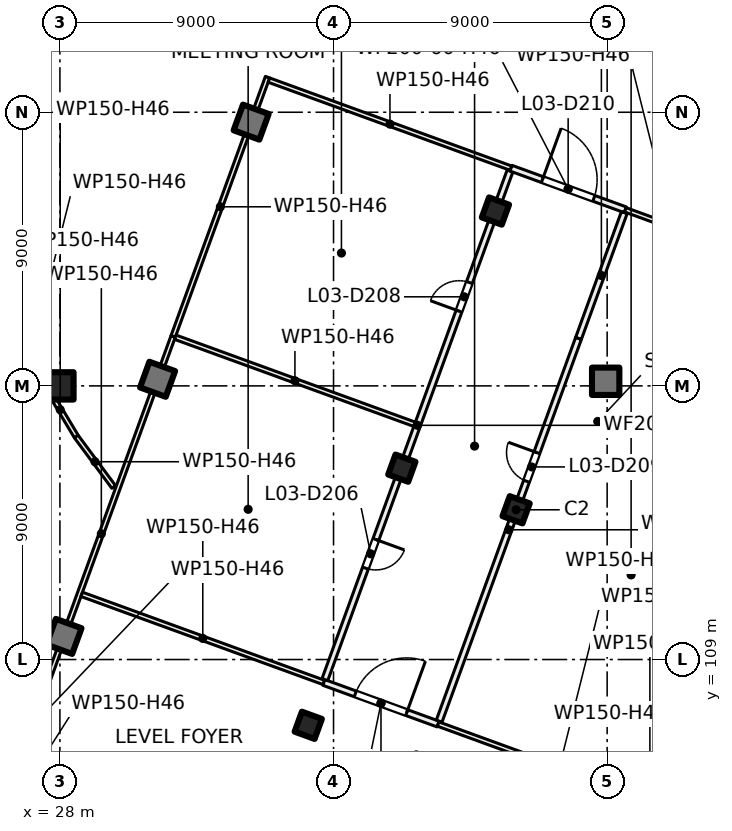
"""IFC4 building model, lengths in metres.
Left out: names, types, materials, properties, quantities, classifications, styles, units other than length and angle.
Written with IfcOpenShell. Run it as: python <this file> out.ifc"""

import sys

from ifc_helpers import new_model, si_unit, direction, frame, frame_2d, origin, origin_2d, place, context, subcontext, project, spatial, rectangle, extrude, element, fill, save


model = new_model("IFC4")
c1 = context("Model", 3, precision=1e-05, world=origin(), true_north=direction((0.0, 1.0)))
c2 = subcontext(c1, "Body", "Model", "MODEL_VIEW")
j1 = project(units=[si_unit("LENGTHUNIT", "METRE"), si_unit("PLANEANGLEUNIT", "RADIAN")], contexts=[c1])
p1 = place(None, origin())
s1 = spatial("IfcSite", under=j1, at=p1, CompositionType="ELEMENT")
p2 = place(p1, origin())
s2 = spatial("IfcBuilding", under=s1, at=p2, CompositionType="ELEMENT")
p3 = place(p2, frame((0.0, 0.0, 17.5)))
s3 = spatial("IfcBuildingStorey", under=s2, at=p3, CompositionType="ELEMENT", Elevation=17.5)
for number, where, z_axis, x_axis in (
    (1, (28.0, 118.0, 0.0), (0.0, 0.0, 1.0), (1.0, 0.0, 0.0)),
    (2, (45.952, 118.152, 0.0), (0.0, 0.0, 1.0), (1.0, 0.0, 0.0)),
):
    element("IfcColumn", number, at=place(p3, frame(where, z_axis=z_axis, x_axis=x_axis)), inside=s3, PredefinedType="COLUMN", context=c2, shape_type="SweptSolid", body=[
        extrude(rectangle(XDim=0.9, YDim=0.9, at=origin_2d()), origin(), (0.0, 0.0, 1.0), 5.0),
    ])
for number, where, z_axis, x_axis in (
    (3, (43.006, 113.925, 0.0), (0.0, 0.0, 1.0), (-0.342, -0.94, 0.0)),
    (4, (42.325, 123.751, 0.0), (0.0, 0.0, 1.0), (-0.342, -0.94, 0.0)),
    (5, (39.247, 115.293, 0.0), (0.0, 0.0, 1.0), (-0.342, -0.94, 0.0)),
    (6, (36.169, 106.836, 0.0), (0.0, 0.0, 1.0), (-0.342, -0.94, 0.0)),
):
    element("IfcColumn", number, at=place(p3, frame(where, z_axis=z_axis, x_axis=x_axis)), inside=s3, PredefinedType="COLUMN", context=c2, shape_type="SweptSolid", body=[
        extrude(rectangle(XDim=0.7, YDim=0.7, at=origin_2d()), origin(), (0.0, 0.0, 1.0), 5.0),
    ])
for number, where, z_axis, x_axis in (
    (7, (34.291, 126.675, 0.0), (0.0, 0.0, 1.0), (-0.342, -0.94, 0.0)),
    (8, (31.212, 118.218, 0.0), (0.0, 0.0, 1.0), (-0.342, -0.94, 0.0)),
    (9, (28.134, 109.76, 0.0), (0.0, 0.0, 1.0), (-0.342, -0.94, 0.0)),
):
    element("IfcColumn", number, at=place(p3, frame(where, z_axis=z_axis, x_axis=x_axis)), inside=s3, PredefinedType="COLUMN", context=c2, shape_type="SweptSolid", body=[
        extrude(rectangle(XDim=0.9, YDim=0.9, at=origin_2d()), origin(), (0.0, 0.0, 1.0), 5.0),
    ])
p4 = place(p3, frame((12.199, 89.809, 0.0), z_axis=(0.0, 0.0, 1.0), x_axis=(0.342022998908, 0.939691581434, 0.0)))
e10 = element("IfcWall", 10, at=p4, inside=s3, PredefinedType="SOLIDWALL", context=c2, shape_type="SweptSolid", body=[
    extrude(rectangle(XDim=47.334, YDim=0.6, at=frame_2d((23.667, 0.0))), origin(), (0.0, 0.0, 1.0), 4.6),
])
p5 = place(p4, frame((0.773, 0.0, 0.9)))
e11 = element("IfcOpeningElement", 11, at=p5, cuts=e10, PredefinedType="OPENING", context=c2, shape_type="SweptSolid", body=[
    extrude(rectangle(XDim=3.0, YDim=3.0, at=frame_2d((1.5, 1.5))), frame((0.0, 0.31, 0.0), z_axis=(0.0, -1.0, 0.0), x_axis=(1.0, 0.0, 0.0)), (0.0, 0.0, 1.0), 0.62),
])
p6 = place(p4, frame((5.379, 0.0, 0.9)))
e12 = element("IfcOpeningElement", 12, at=p6, cuts=e10, PredefinedType="OPENING", context=c2, shape_type="SweptSolid", body=[
    extrude(rectangle(XDim=3.0, YDim=3.0, at=frame_2d((1.5, 1.5))), frame((0.0, 0.31, 0.0), z_axis=(0.0, -1.0, 0.0), x_axis=(1.0, 0.0, 0.0)), (0.0, 0.0, 1.0), 0.62),
])
p7 = place(p4, frame((9.235, 0.0, 0.9)))
e13 = element("IfcOpeningElement", 13, at=p7, cuts=e10, PredefinedType="OPENING", context=c2, shape_type="SweptSolid", body=[
    extrude(rectangle(XDim=3.0, YDim=3.0, at=frame_2d((1.5, 1.5))), frame((0.0, 0.31, 0.0), z_axis=(0.0, -1.0, 0.0), x_axis=(1.0, 0.0, 0.0)), (0.0, 0.0, 1.0), 0.62),
])
p8 = place(p4, frame((13.99, 0.0, 0.9)))
e14 = element("IfcOpeningElement", 14, at=p8, cuts=e10, PredefinedType="OPENING", context=c2, shape_type="SweptSolid", body=[
    extrude(rectangle(XDim=3.0, YDim=3.0, at=frame_2d((1.5, 1.5))), frame((0.0, 0.31, 0.0), z_axis=(0.0, -1.0, 0.0), x_axis=(1.0, 0.0, 0.0)), (0.0, 0.0, 1.0), 0.62),
])
p9 = place(p4, frame((18.118, 0.0, 0.9)))
e15 = element("IfcOpeningElement", 15, at=p9, cuts=e10, PredefinedType="OPENING", context=c2, shape_type="SweptSolid", body=[
    extrude(rectangle(XDim=1.2, YDim=3.0, at=frame_2d((0.6, 1.5))), frame((0.0, 0.31, 0.0), z_axis=(0.0, -1.0, 0.0), x_axis=(1.0, 0.0, 0.0)), (0.0, 0.0, 1.0), 0.62),
])
p10 = place(p4, frame((19.618, 0.0, 0.9)))
e16 = element("IfcOpeningElement", 16, at=p10, cuts=e10, PredefinedType="OPENING", context=c2, shape_type="SweptSolid", body=[
    extrude(rectangle(XDim=1.2, YDim=3.0, at=frame_2d((0.6, 1.5))), frame((0.0, 0.31, 0.0), z_axis=(0.0, -1.0, 0.0), x_axis=(1.0, 0.0, 0.0)), (0.0, 0.0, 1.0), 0.62),
])
p11 = place(p4, frame((22.452, 0.0, 0.9)))
e17 = element("IfcOpeningElement", 17, at=p11, cuts=e10, PredefinedType="OPENING", context=c2, shape_type="SweptSolid", body=[
    extrude(rectangle(XDim=3.0, YDim=3.0, at=frame_2d((1.5, 1.5))), frame((0.0, 0.31, 0.0), z_axis=(0.0, -1.0, 0.0), x_axis=(1.0, 0.0, 0.0)), (0.0, 0.0, 1.0), 0.62),
])
p12 = place(p4, frame((26.458, 0.0, 0.9)))
e18 = element("IfcOpeningElement", 18, at=p12, cuts=e10, PredefinedType="OPENING", context=c2, shape_type="SweptSolid", body=[
    extrude(rectangle(XDim=3.0, YDim=3.0, at=frame_2d((1.5, 1.5))), frame((0.0, 0.31, 0.0), z_axis=(0.0, -1.0, 0.0), x_axis=(1.0, 0.0, 0.0)), (0.0, 0.0, 1.0), 0.62),
])
p13 = place(p4, frame((32.484, 0.0, 0.9)))
e19 = element("IfcOpeningElement", 19, at=p13, cuts=e10, PredefinedType="OPENING", context=c2, shape_type="SweptSolid", body=[
    extrude(rectangle(XDim=1.2, YDim=3.0, at=frame_2d((0.6, 1.5))), frame((0.0, 0.31, 0.0), z_axis=(0.0, -1.0, 0.0), x_axis=(1.0, 0.0, 0.0)), (0.0, 0.0, 1.0), 0.62),
])
p14 = place(p4, frame((35.07, 0.0, 0.9)))
e20 = element("IfcOpeningElement", 20, at=p14, cuts=e10, PredefinedType="OPENING", context=c2, shape_type="SweptSolid", body=[
    extrude(rectangle(XDim=3.0, YDim=3.0, at=frame_2d((1.5, 1.5))), frame((0.0, 0.31, 0.0), z_axis=(0.0, -1.0, 0.0), x_axis=(1.0, 0.0, 0.0)), (0.0, 0.0, 1.0), 0.62),
])
p15 = place(p4, frame((39.676, 0.0, 0.9)))
e21 = element("IfcOpeningElement", 21, at=p15, cuts=e10, PredefinedType="OPENING", context=c2, shape_type="SweptSolid", body=[
    extrude(rectangle(XDim=3.0, YDim=3.0, at=frame_2d((1.5, 1.5))), frame((0.0, 0.31, 0.0), z_axis=(0.0, -1.0, 0.0), x_axis=(1.0, 0.0, 0.0)), (0.0, 0.0, 1.0), 0.62),
])
p16 = place(p4, frame((43.531, 0.0, 0.9)))
e22 = element("IfcOpeningElement", 22, at=p16, cuts=e10, PredefinedType="OPENING", context=c2, shape_type="SweptSolid", body=[
    extrude(rectangle(XDim=3.0, YDim=3.0, at=frame_2d((1.5, 1.5))), frame((0.0, 0.31, 0.0), z_axis=(0.0, -1.0, 0.0), x_axis=(1.0, 0.0, 0.0)), (0.0, 0.0, 1.0), 0.62),
])
p17 = place(p3, frame((27.0, 106.644, 0.0), z_axis=(0.0, 0.0, 1.0), x_axis=(0.3420012765, 0.939699487534, 0.0)))
e23 = element("IfcWall", 23, at=p17, inside=s3, PredefinedType="PARTITIONING", context=c2, shape_type="SweptSolid", body=[
    extrude(rectangle(XDim=13.816, YDim=0.15, at=frame_2d((6.908, 0.0))), origin(), (0.0, 0.0, 1.0), 4.6),
])
p18 = place(p3, frame((27.478, 118.104, 0.0), z_axis=(0.0, 0.0, 1.0), x_axis=(0.514009565734, -0.857784452141, 0.0)))
e24 = element("IfcWall", 24, at=p18, inside=s3, PredefinedType="PARTITIONING", context=c2, shape_type="SweptSolid", body=[
    extrude(rectangle(XDim=2.068, YDim=0.15, at=frame_2d((1.034, 0.0))), origin(), (0.0, 0.0, 1.0), 4.6),
])
p19 = place(p3, frame((28.537, 116.336, 0.0), z_axis=(0.0, 0.0, 1.0), x_axis=(0.595741297031, -0.80317638599, 0.0)))
e25 = element("IfcWall", 25, at=p19, inside=s3, PredefinedType="PARTITIONING", context=c2, shape_type="SweptSolid", body=[
    extrude(rectangle(XDim=2.068, YDim=0.15, at=frame_2d((1.034, 0.0))), origin(), (0.0, 0.0, 1.0), 4.6),
])
p20 = place(p3, frame((28.717, 111.144, 0.0), z_axis=(0.0, 0.0, 1.0), x_axis=(0.939731172492, -0.341914204803, 0.0)))
e26 = element("IfcWall", 26, at=p20, inside=s3, PredefinedType="PARTITIONING", context=c2, shape_type="SweptSolid", body=[
    extrude(rectangle(XDim=8.476, YDim=0.15, at=frame_2d((4.238, 0.0))), origin(), (0.0, 0.0, 1.0), 4.6),
])
p21 = place(p3, frame((31.725, 119.627, 0.0), z_axis=(0.0, 0.0, 1.0), x_axis=(0.342153449842, 0.939644090473, 0.0)))
e27 = element("IfcWall", 27, at=p21, inside=s3, PredefinedType="PARTITIONING", context=c2, shape_type="SweptSolid", body=[
    extrude(rectangle(XDim=9.075, YDim=0.15, at=frame_2d((4.537, 0.0))), origin(), (0.0, 0.0, 1.0), 4.6),
])
p22 = place(p3, frame((31.795, 119.601, 0.0), z_axis=(0.0, 0.0, 1.0), x_axis=(0.93972447093, -0.341932623092, 0.0)))
e28 = element("IfcWall", 28, at=p22, inside=s3, PredefinedType="PARTITIONING", context=c2, shape_type="SweptSolid", body=[
    extrude(rectangle(XDim=8.376, YDim=0.15, at=frame_2d((4.188, 0.0))), origin(), (0.0, 0.0, 1.0), 4.6),
])
p23 = place(p3, frame((34.874, 128.058, 0.0), z_axis=(0.0, 0.0, 1.0), x_axis=(0.939708443164, -0.341976668571, 0.0)))
e29 = element("IfcWall", 29, at=p23, inside=s3, PredefinedType="PARTITIONING", context=c2, shape_type="SweptSolid", body=[
    extrude(rectangle(XDim=8.475, YDim=0.15, at=frame_2d((4.237, 0.0))), origin(), (0.0, 0.0, 1.0), 4.6),
])
p24 = place(p3, frame((40.44, 106.878, 0.0), z_axis=(0.0, 0.0, 1.0), x_axis=(-0.939665029144, 0.342095941228, 0.0)))
e30 = element("IfcWall", 30, at=p24, inside=s3, PredefinedType="PARTITIONING", context=c2, shape_type="SweptSolid", body=[
    extrude(rectangle(XDim=3.999, YDim=0.2, at=frame_2d((2.0, 0.0))), origin(), (0.0, 0.0, 1.0), 4.6),
])
p25 = place(p24, frame((1.099, 0.0, 0.0)))
e31 = element("IfcOpeningElement", 31, at=p25, cuts=e30, PredefinedType="OPENING", context=c2, shape_type="SweptSolid", body=[
    extrude(rectangle(XDim=1.8, YDim=2.1, at=frame_2d((0.9, 1.05))), frame((0.0, 0.11, 0.0), z_axis=(0.0, -1.0, 0.0), x_axis=(1.0, 0.0, 0.0)), (0.0, 0.0, 1.0), 0.22),
])
p26 = place(p3, frame((36.716, 108.34, 0.0), z_axis=(0.0, 0.0, 1.0), x_axis=(0.342029387276, 0.939689256212, 0.0)))
e32 = element("IfcWall", 32, at=p26, inside=s3, PredefinedType="PARTITIONING", context=c2, shape_type="SweptSolid", body=[
    extrude(rectangle(XDim=17.799, YDim=0.2, at=frame_2d((8.9, 0.0))), origin(), (0.0, 0.0, 1.0), 4.6),
])
p27 = place(p26, frame((3.902, 0.0, 0.0)))
e33 = element("IfcOpeningElement", 33, at=p27, cuts=e32, PredefinedType="OPENING", context=c2, shape_type="SweptSolid", body=[
    extrude(rectangle(XDim=1.0, YDim=2.1, at=frame_2d((0.5, 1.05))), frame((0.0, 0.11, 0.0), z_axis=(0.0, -1.0, 0.0), x_axis=(1.0, 0.0, 0.0)), (0.0, 0.0, 1.0), 0.22),
])
p28 = place(p26, frame((12.898, 0.0, 0.0)))
e34 = element("IfcOpeningElement", 34, at=p28, cuts=e32, PredefinedType="OPENING", context=c2, shape_type="SweptSolid", body=[
    extrude(rectangle(XDim=1.0, YDim=2.1, at=frame_2d((0.5, 1.05))), frame((0.0, 0.11, 0.0), z_axis=(0.0, -1.0, 0.0), x_axis=(1.0, 0.0, 0.0)), (0.0, 0.0, 1.0), 0.22),
])
p29 = place(p3, frame((45.058, 119.563, 0.0), z_axis=(0.0, 0.0, 1.0), x_axis=(-0.342099992172, -0.93966355434, 0.0)))
e35 = element("IfcWall", 35, at=p29, inside=s3, PredefinedType="PARTITIONING", context=c2, shape_type="SweptSolid", body=[
    extrude(rectangle(XDim=13.4, YDim=0.2, at=frame_2d((6.7, 0.0))), origin(), (0.0, 0.0, 1.0), 4.6),
])
p30 = place(p29, frame((4.0, 0.0, 0.0)))
e36 = element("IfcOpeningElement", 36, at=p30, cuts=e35, PredefinedType="OPENING", context=c2, shape_type="SweptSolid", body=[
    extrude(rectangle(XDim=1.0, YDim=2.1, at=frame_2d((0.5, 1.05))), frame((0.0, 0.11, 0.0), z_axis=(0.0, -1.0, 0.0), x_axis=(1.0, 0.0, 0.0)), (0.0, 0.0, 1.0), 0.22),
])
p31 = place(p3, frame((40.44, 106.878, 0.0), z_axis=(0.0, 0.0, 1.0), x_axis=(0.939697516706, -0.342006691597, 0.0)))
e37 = element("IfcWall", 37, at=p31, inside=s3, PredefinedType="PARTITIONING", context=c2, shape_type="SweptSolid", body=[
    extrude(rectangle(XDim=8.476, YDim=0.15, at=frame_2d((4.238, 0.0))), origin(), (0.0, 0.0, 1.0), 4.6),
])
p32 = place(p3, frame((42.838, 125.16, 0.0), z_axis=(0.0, 0.0, 1.0), x_axis=(0.939713209288, -0.341963571582, 0.0)))
e38 = element("IfcWall", 38, at=p32, inside=s3, PredefinedType="PARTITIONING", context=c2, shape_type="SweptSolid", body=[
    extrude(rectangle(XDim=4.0, YDim=0.2, at=frame_2d((2.0, 0.0))), origin(), (0.0, 0.0, 1.0), 4.6),
])
p33 = place(p32, frame((1.1, 0.0, 0.0)))
e39 = element("IfcOpeningElement", 39, at=p33, cuts=e38, PredefinedType="OPENING", context=c2, shape_type="SweptSolid", body=[
    extrude(rectangle(XDim=1.8, YDim=2.1, at=frame_2d((0.9, 1.05))), frame((0.0, 0.11, 0.0), z_axis=(0.0, -1.0, 0.0), x_axis=(1.0, 0.0, 0.0)), (0.0, 0.0, 1.0), 0.22),
])
p34 = place(p3, frame((45.058, 119.563, 0.0), z_axis=(0.0, 0.0, 1.0), x_axis=(0.34199251863, 0.939702674893, 0.0)))
e40 = element("IfcWall", 40, at=p34, inside=s3, PredefinedType="PARTITIONING", context=c2, shape_type="SweptSolid", body=[
    extrude(rectangle(XDim=4.4, YDim=0.2, at=frame_2d((2.2, 0.0))), origin(), (0.0, 0.0, 1.0), 4.6),
])
p35 = place(p3, frame((46.597, 123.792, 0.0), z_axis=(0.0, 0.0, 1.0), x_axis=(0.939619227089, -0.342221723572, 0.0)))
e41 = element("IfcWall", 41, at=p35, inside=s3, PredefinedType="PARTITIONING", context=c2, shape_type="SweptSolid", body=[
    extrude(rectangle(XDim=3.276, YDim=0.15, at=frame_2d((1.638, 0.0))), origin(), (0.0, 0.0, 1.0), 4.6),
])
p36 = place(p27, origin())
e42 = element("IfcDoor", 42, at=p36, inside=s3, OperationType="SINGLE_SWING_RIGHT", PredefinedType="DOOR", context=c2, shape_type="SweptSolid", body=[
    extrude(rectangle(XDim=1.0, YDim=2.1, at=frame_2d((0.5, 1.05))), frame((0.0, 0.025, 0.0), z_axis=(0.0, -1.0, 0.0), x_axis=(1.0, 0.0, 0.0)), (0.0, 0.0, 1.0), 0.05),
])
fill(e33, e42)
p37 = place(p25, origin())
e43 = element("IfcDoor", 43, at=p37, inside=s3, OperationType="DOUBLE_DOOR_SINGLE_SWING", PredefinedType="DOOR", context=c2, shape_type="SweptSolid", body=[
    extrude(rectangle(XDim=1.8, YDim=2.1, at=frame_2d((0.9, 1.05))), frame((0.0, 0.025, 0.0), z_axis=(0.0, -1.0, 0.0), x_axis=(1.0, 0.0, 0.0)), (0.0, 0.0, 1.0), 0.05),
])
fill(e31, e43)
p38 = place(p28, origin())
e44 = element("IfcDoor", 44, at=p38, inside=s3, OperationType="SINGLE_SWING_LEFT", PredefinedType="DOOR", context=c2, shape_type="SweptSolid", body=[
    extrude(rectangle(XDim=1.0, YDim=2.1, at=frame_2d((0.5, 1.05))), frame((0.0, 0.025, 0.0), z_axis=(0.0, -1.0, 0.0), x_axis=(1.0, 0.0, 0.0)), (0.0, 0.0, 1.0), 0.05),
])
fill(e34, e44)
p39 = place(p30, origin())
e45 = element("IfcDoor", 45, at=p39, inside=s3, OperationType="SINGLE_SWING_LEFT", PredefinedType="DOOR", context=c2, shape_type="SweptSolid", body=[
    extrude(rectangle(XDim=1.0, YDim=2.1, at=frame_2d((0.5, 1.05))), frame((0.0, 0.025, 0.0), z_axis=(0.0, -1.0, 0.0), x_axis=(1.0, 0.0, 0.0)), (0.0, 0.0, 1.0), 0.05),
])
fill(e36, e45)
p40 = place(p33, origin())
e46 = element("IfcDoor", 46, at=p40, inside=s3, OperationType="DOUBLE_DOOR_SINGLE_SWING", PredefinedType="DOOR", context=c2, shape_type="SweptSolid", body=[
    extrude(rectangle(XDim=1.8, YDim=2.1, at=frame_2d((0.9, 1.05))), frame((0.0, 0.025, 0.0), z_axis=(0.0, -1.0, 0.0), x_axis=(1.0, 0.0, 0.0)), (0.0, 0.0, 1.0), 0.05),
])
fill(e39, e46)
save(model, sys.argv[1])
